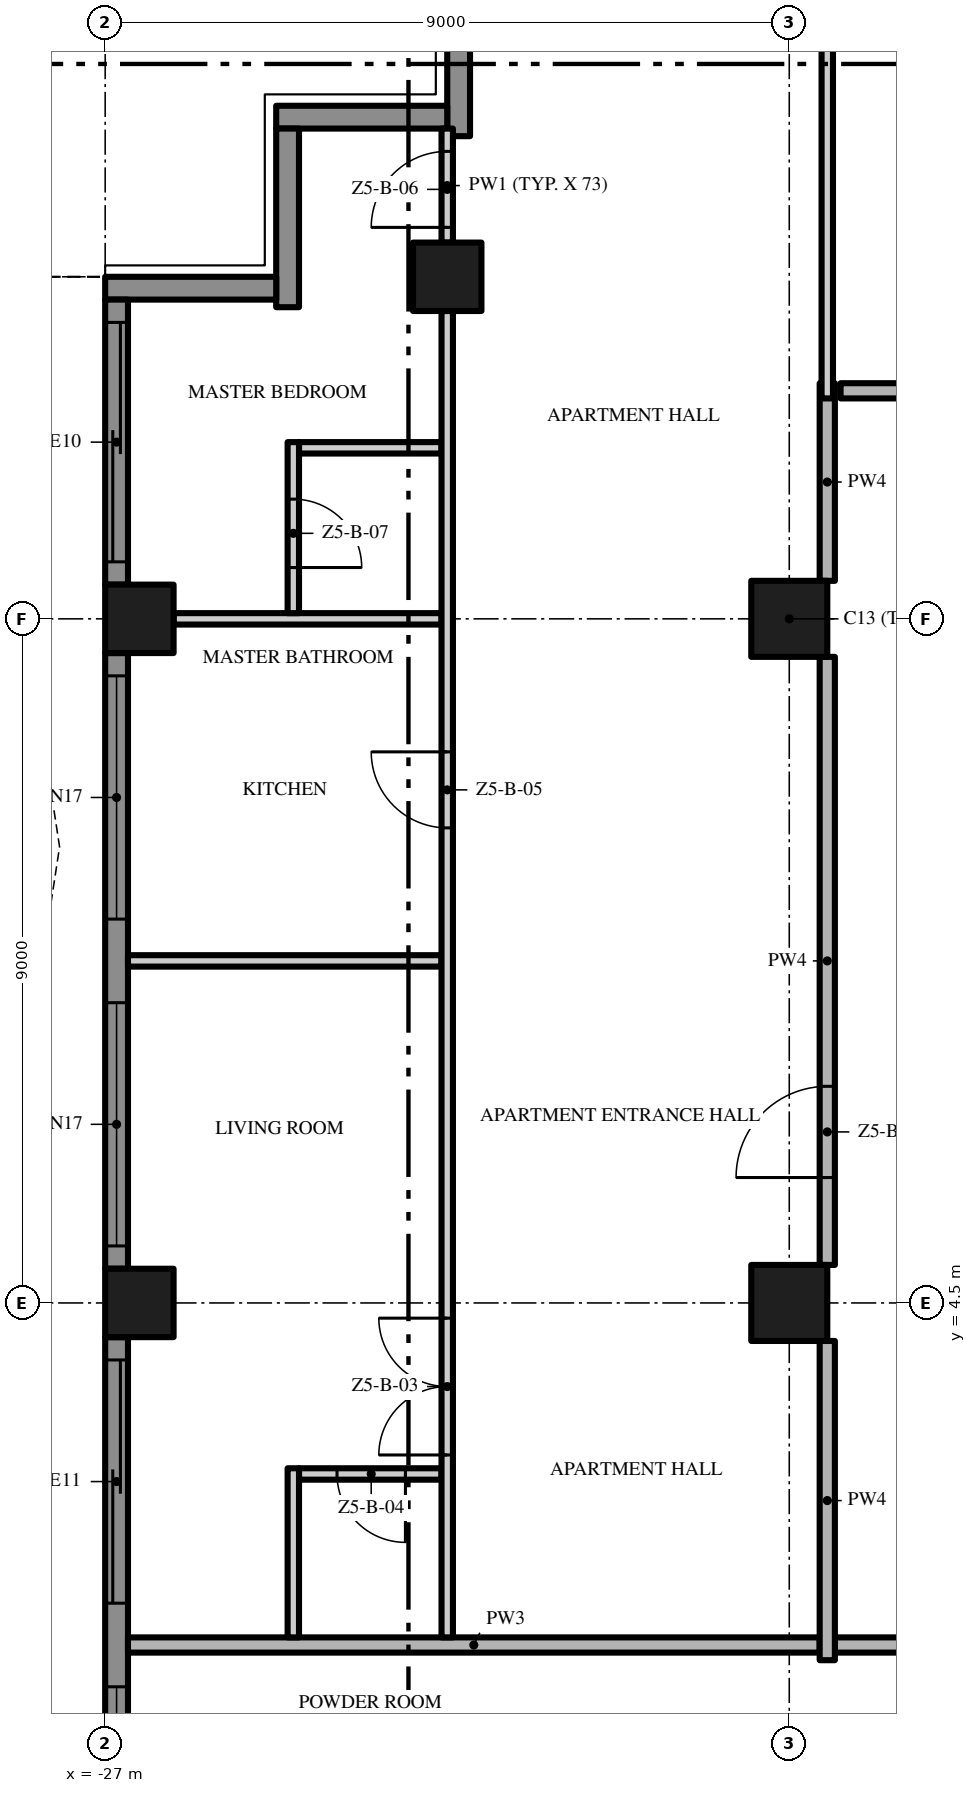
"""IFC4 building model, lengths in metres.
Left out: names, types, materials, properties, quantities, classifications, styles, units other than length and angle.
Written with IfcOpenShell. Run it as: python <this file> out.ifc"""

import sys

from ifc_helpers import new_model, si_unit, direction, frame, frame_2d, origin, origin_2d, place, context, subcontext, project, spatial, polyline, rectangle, outline, extrude, element, fill, save


model = new_model("IFC4")
c1 = context("Model", 3, precision=1e-05, world=origin(), true_north=direction((0.0, 1.0)))
c2 = subcontext(c1, "Body", "Model", "MODEL_VIEW")
j1 = project(units=[si_unit("LENGTHUNIT", "METRE"), si_unit("PLANEANGLEUNIT", "RADIAN")], contexts=[c1])
p1 = place(None, origin())
s1 = spatial("IfcSite", under=j1, at=p1, CompositionType="ELEMENT")
p2 = place(p1, origin())
s2 = spatial("IfcBuilding", under=s1, at=p2, CompositionType="ELEMENT")
p3 = place(p2, frame((0.0, 0.0, 250.2)))
s3 = spatial("IfcBuildingStorey", under=s2, at=p3, CompositionType="ELEMENT", Elevation=250.2)
for number, where, z_axis, x_axis in (
    (1, (-18.0, 13.5, 0.0), (0.0, 0.0, 1.0), (1.0, 0.0, 0.0)),
    (2, (-18.0, 4.5, 0.0), (0.0, 0.0, 1.0), (1.0, 0.0, 0.0)),
):
    element("IfcColumn", number, at=place(p3, frame(where, z_axis=z_axis, x_axis=x_axis)), inside=s3, PredefinedType="COLUMN", context=c2, shape_type="SweptSolid", body=[
        extrude(rectangle(XDim=1.0, YDim=1.0, at=origin_2d()), origin(), (0.0, 0.0, 1.0), 3.5),
    ])
for number, where, z_axis, x_axis in (
    (3, (-26.55, 13.5, 0.0), (0.0, 0.0, 1.0), (1.0, 0.0, 0.0)),
    (4, (-22.5, 18.0, 0.0), (0.0, 0.0, 1.0), (1.0, 0.0, 0.0)),
    (5, (-26.55, 4.5, 0.0), (0.0, 0.0, 1.0), (1.0, 0.0, 0.0)),
):
    element("IfcColumn", number, at=place(p3, frame(where, z_axis=z_axis, x_axis=x_axis)), inside=s3, PredefinedType="COLUMN", context=c2, shape_type="SweptSolid", body=[
        extrude(rectangle(XDim=0.9, YDim=0.9, at=origin_2d()), origin(), (0.0, 0.0, 1.0), 3.5),
    ])
p4 = place(p3, frame((-22.35, 19.85, 0.0), z_axis=(0.0, 0.0, 1.0), x_axis=(0.0, 1.0, 0.0)))
e6 = element("IfcWall", 6, at=p4, inside=s3, PredefinedType="SOLIDWALL", context=c2, shape_type="SweptSolid", body=[
    extrude(rectangle(XDim=2.35, YDim=0.3, at=frame_2d((1.175, 0.0))), origin(), (0.0, 0.0, 1.0), 3.5),
])
p5 = place(p3, frame((-24.75, 20.1, 0.0), z_axis=(0.0, 0.0, 1.0), x_axis=(1.0, 0.0, 0.0)))
e7 = element("IfcWall", 7, at=p5, inside=s3, PredefinedType="SOLIDWALL", context=c2, shape_type="SweptSolid", body=[
    extrude(rectangle(XDim=2.25, YDim=0.3, at=frame_2d((1.125, 0.0))), origin(), (0.0, 0.0, 1.0), 3.5),
])
p6 = place(p3, frame((-24.6, 17.6, 0.0), z_axis=(0.0, 0.0, 1.0), x_axis=(0.0, 1.0, 0.0)))
e8 = element("IfcWall", 8, at=p6, inside=s3, PredefinedType="SOLIDWALL", context=c2, shape_type="SweptSolid", body=[
    extrude(rectangle(XDim=2.35, YDim=0.3, at=frame_2d((1.175, 0.0))), origin(), (0.0, 0.0, 1.0), 3.5),
])
p7 = place(p3, frame((-27.0, 17.85, 0.0), z_axis=(0.0, 0.0, 1.0), x_axis=(1.0, 0.0, 0.0)))
e9 = element("IfcWall", 9, at=p7, inside=s3, PredefinedType="SOLIDWALL", context=c2, shape_type="SweptSolid", body=[
    extrude(rectangle(XDim=2.25, YDim=0.3, at=frame_2d((1.125, 0.0))), origin(), (0.0, 0.0, 1.0), 3.5),
])
p8 = place(p3, frame((-26.85, 13.95, 0.0), z_axis=(0.0, 0.0, 1.0), x_axis=(0.0, 1.0, 0.0)))
e10 = element("IfcWall", 10, at=p8, inside=s3, PredefinedType="SOLIDWALL", context=c2, shape_type="SweptSolid", body=[
    extrude(rectangle(XDim=3.75, YDim=0.3, at=frame_2d((1.875, 0.0))), origin(), (0.0, 0.0, 1.0), 3.5),
])
p9 = place(p8, frame((0.3, 0.0, 0.0)))
e11 = element("IfcOpeningElement", 11, at=p9, cuts=e10, PredefinedType="OPENING", context=c2, shape_type="SweptSolid", body=[
    extrude(rectangle(XDim=3.15, YDim=2.4, at=frame_2d((1.575, 1.2))), frame((0.0, 0.16, 0.0), z_axis=(0.0, -1.0, 0.0), x_axis=(1.0, 0.0, 0.0)), (0.0, 0.0, 1.0), 0.32),
])
p10 = place(p3, frame((-26.85, 4.95, 0.0), z_axis=(0.0, 0.0, 1.0), x_axis=(0.0, 1.0, 0.0)))
e12 = element("IfcWall", 12, at=p10, inside=s3, PredefinedType="SOLIDWALL", context=c2, shape_type="SweptSolid", body=[
    extrude(rectangle(XDim=8.1, YDim=0.3, at=frame_2d((4.05, 0.0))), origin(), (0.0, 0.0, 1.0), 3.5),
])
p11 = place(p10, frame((4.6, 0.0, 0.45)))
e13 = element("IfcOpeningElement", 13, at=p11, cuts=e12, PredefinedType="OPENING", context=c2, shape_type="SweptSolid", body=[
    extrude(rectangle(XDim=3.2, YDim=2.65, at=frame_2d((1.6, 1.325))), frame((0.0, 0.16, 0.0), z_axis=(0.0, -1.0, 0.0), x_axis=(1.0, 0.0, 0.0)), (0.0, 0.0, 1.0), 0.32),
])
p12 = place(p10, frame((0.3, 0.0, 0.45)))
e14 = element("IfcOpeningElement", 14, at=p12, cuts=e12, PredefinedType="OPENING", context=c2, shape_type="SweptSolid", body=[
    extrude(rectangle(XDim=3.2, YDim=2.65, at=frame_2d((1.6, 1.325))), frame((0.0, 0.16, 0.0), z_axis=(0.0, -1.0, 0.0), x_axis=(1.0, 0.0, 0.0)), (0.0, 0.0, 1.0), 0.32),
])
p13 = place(p3, frame((-26.85, -4.05, 0.0), z_axis=(0.0, 0.0, 1.0), x_axis=(0.0, 1.0, 0.0)))
e15 = element("IfcWall", 15, at=p13, inside=s3, PredefinedType="SOLIDWALL", context=c2, shape_type="SweptSolid", body=[
    extrude(rectangle(XDim=8.1, YDim=0.3, at=frame_2d((4.05, 0.0))), origin(), (0.0, 0.0, 1.0), 3.5),
])
p14 = place(p13, frame((4.6, 0.0, 0.0)))
e16 = element("IfcOpeningElement", 16, at=p14, cuts=e15, PredefinedType="OPENING", context=c2, shape_type="SweptSolid", body=[
    extrude(rectangle(XDim=3.2, YDim=2.4, at=frame_2d((1.6, 1.2))), frame((0.0, 0.16, 0.0), z_axis=(0.0, -1.0, 0.0), x_axis=(1.0, 0.0, 0.0)), (0.0, 0.0, 1.0), 0.32),
])
p15 = place(p13, frame((0.3, 0.0, 0.45)))
e17 = element("IfcOpeningElement", 17, at=p15, cuts=e15, PredefinedType="OPENING", context=c2, shape_type="SweptSolid", body=[
    extrude(rectangle(XDim=3.2, YDim=2.65, at=frame_2d((1.6, 1.325))), frame((0.0, 0.16, 0.0), z_axis=(0.0, -1.0, 0.0), x_axis=(1.0, 0.0, 0.0)), (0.0, 0.0, 1.0), 0.32),
])
p16 = place(p3, origin())
e18 = element("IfcWall", 18, at=p16, inside=s3, PredefinedType="USERDEFINED", context=c2, shape_type="SweptSolid", body=[
    extrude(outline(polyline([(-30.0, 18.0), (-29.771, 16.5), (-29.171, 15.0), (-28.429, 13.5), (-27.829, 12.0), (-27.6, 10.5), (-27.829, 9.0), (-28.429, 7.5), (-29.171, 6.0), (-29.771, 4.5), (-30.0, 3.0), (-29.771, 1.5), (-29.171, 0.0), (-28.429, -1.5), (-27.829, -3.0), (-27.6, -4.5), (-27.829, -6.0), (-28.429, -7.5), (-29.171, -9.0), (-29.771, -10.5), (-30.0, -12.0), (-29.771, -13.5), (-29.171, -15.0), (-28.429, -16.5), (-27.829, -18.0), (-27.597, -17.907), (-28.201, -16.398), (-28.942, -14.898), (-29.528, -13.434), (-29.747, -12.0), (-29.528, -10.566), (-28.942, -9.102), (-28.201, -7.602), (-27.586, -6.066), (-27.347, -4.5), (-27.586, -2.934), (-28.201, -1.398), (-28.942, 0.102), (-29.528, 1.566), (-29.747, 3.0), (-29.528, 4.434), (-28.942, 5.898), (-28.201, 7.398), (-27.586, 8.934), (-27.347, 10.5), (-27.586, 12.066), (-28.201, 13.602), (-28.942, 15.102), (-29.528, 16.566), (-29.753, 18.038), (-30.0, 18.0)])), origin(), (0.0, 0.0, 1.0), 0.9),
])
p17 = place(p3, frame((17.4, 0.0, 0.0), z_axis=(0.0, 0.0, 1.0), x_axis=(-1.0, 0.0, 0.0)))
e19 = element("IfcWall", 19, at=p17, inside=s3, PredefinedType="PARTITIONING", context=c2, shape_type="SweptSolid", body=[
    extrude(rectangle(XDim=34.8, YDim=0.2, at=frame_2d((17.4, 0.0))), origin(), (0.0, 0.0, 1.0), 3.5),
])
p18 = place(p17, frame((23.4, 0.0, 0.0)))
e20 = element("IfcOpeningElement", 20, at=p18, cuts=e19, PredefinedType="OPENING", context=c2, shape_type="SweptSolid", body=[
    extrude(rectangle(XDim=1.5, YDim=2.4, at=frame_2d((0.75, 1.2))), frame((0.0, 0.11, 0.0), z_axis=(0.0, -1.0, 0.0), x_axis=(1.0, 0.0, 0.0)), (0.0, 0.0, 1.0), 0.22),
])
p19 = place(p17, frame((5.4, 0.0, 0.0)))
e21 = element("IfcOpeningElement", 21, at=p19, cuts=e19, PredefinedType="OPENING", context=c2, shape_type="SweptSolid", body=[
    extrude(rectangle(XDim=1.5, YDim=2.4, at=frame_2d((0.75, 1.2))), frame((0.0, 0.11, 0.0), z_axis=(0.0, -1.0, 0.0), x_axis=(1.0, 0.0, 0.0)), (0.0, 0.0, 1.0), 0.22),
])
p20 = place(p3, frame((-26.7, 0.0, 0.0), z_axis=(0.0, 0.0, 1.0), x_axis=(1.0, 0.0, 0.0)))
e22 = element("IfcWall", 22, at=p20, inside=s3, PredefinedType="PARTITIONING", context=c2, shape_type="SweptSolid", body=[
    extrude(rectangle(XDim=9.1, YDim=0.2, at=frame_2d((4.55, 0.0))), origin(), (0.0, 0.0, 1.0), 3.5),
])
p21 = place(p3, frame((-22.575, 2.25, 0.0), z_axis=(0.0, 0.0, 1.0), x_axis=(-1.0, 0.0, 0.0)))
e23 = element("IfcWall", 23, at=p21, inside=s3, PredefinedType="PARTITIONING", context=c2, shape_type="SweptSolid", body=[
    extrude(rectangle(XDim=1.875, YDim=0.15, at=frame_2d((0.938, 0.0))), origin(), (0.0, 0.0, 1.0), 3.5),
])
p22 = place(p21, frame((0.475, 0.0, 0.0)))
e24 = element("IfcOpeningElement", 24, at=p22, cuts=e23, PredefinedType="OPENING", context=c2, shape_type="SweptSolid", body=[
    extrude(rectangle(XDim=0.9, YDim=2.1, at=frame_2d((0.45, 1.05))), frame((0.0, 0.085, 0.0), z_axis=(0.0, -1.0, 0.0), x_axis=(1.0, 0.0, 0.0)), (0.0, 0.0, 1.0), 0.17),
])
p23 = place(p3, frame((-26.7, 9.0, 0.0), z_axis=(0.0, 0.0, 1.0), x_axis=(1.0, 0.0, 0.0)))
e25 = element("IfcWall", 25, at=p23, inside=s3, PredefinedType="PARTITIONING", context=c2, shape_type="SweptSolid", body=[
    extrude(rectangle(XDim=4.125, YDim=0.15, at=frame_2d((2.062, 0.0))), origin(), (0.0, 0.0, 1.0), 3.5),
])
p24 = place(p3, frame((-26.1, 13.5, 0.0), z_axis=(0.0, 0.0, 1.0), x_axis=(1.0, 0.0, 0.0)))
e26 = element("IfcWall", 26, at=p24, inside=s3, PredefinedType="PARTITIONING", context=c2, shape_type="SweptSolid", body=[
    extrude(rectangle(XDim=3.525, YDim=0.15, at=frame_2d((1.762, 0.0))), origin(), (0.0, 0.0, 1.0), 3.5),
])
p25 = place(p3, frame((-24.45, 15.75, 0.0), z_axis=(0.0, 0.0, 1.0), x_axis=(1.0, 0.0, 0.0)))
e27 = element("IfcWall", 27, at=p25, inside=s3, PredefinedType="PARTITIONING", context=c2, shape_type="SweptSolid", body=[
    extrude(rectangle(XDim=1.875, YDim=0.15, at=frame_2d((0.938, 0.0))), origin(), (0.0, 0.0, 1.0), 3.5),
])
p26 = place(p3, frame((-17.325, 16.5, 0.0), z_axis=(0.0, 0.0, 1.0), x_axis=(1.0, 0.0, 0.0)))
e28 = element("IfcWall", 28, at=p26, inside=s3, PredefinedType="PARTITIONING", context=c2, shape_type="SweptSolid", body=[
    extrude(rectangle(XDim=3.825, YDim=0.2, at=frame_2d((1.913, 0.0))), origin(), (0.0, 0.0, 1.0), 3.5),
])
p27 = place(p26, frame((1.35, 0.0, 0.0)))
e29 = element("IfcOpeningElement", 29, at=p27, cuts=e28, PredefinedType="OPENING", context=c2, shape_type="SweptSolid", body=[
    extrude(rectangle(XDim=0.9, YDim=2.1, at=frame_2d((0.45, 1.05))), frame((0.0, 0.11, 0.0), z_axis=(0.0, -1.0, 0.0), x_axis=(1.0, 0.0, 0.0)), (0.0, 0.0, 1.0), 0.22),
])
p28 = place(p3, frame((-24.525, 0.1, 0.0), z_axis=(0.0, 0.0, 1.0), x_axis=(0.0, 1.0, 0.0)))
e30 = element("IfcWall", 30, at=p28, inside=s3, PredefinedType="PARTITIONING", context=c2, shape_type="SweptSolid", body=[
    extrude(rectangle(XDim=2.225, YDim=0.15, at=frame_2d((1.113, 0.0))), origin(), (0.0, 0.0, 1.0), 3.5),
])
p29 = place(p3, frame((-24.525, 15.825, 0.0), z_axis=(0.0, 0.0, 1.0), x_axis=(0.0, -1.0, 0.0)))
e31 = element("IfcWall", 31, at=p29, inside=s3, PredefinedType="PARTITIONING", context=c2, shape_type="SweptSolid", body=[
    extrude(rectangle(XDim=2.25, YDim=0.15, at=frame_2d((1.125, 0.0))), origin(), (0.0, 0.0, 1.0), 3.5),
])
p30 = place(p29, frame((0.75, 0.0, 0.0)))
e32 = element("IfcOpeningElement", 32, at=p30, cuts=e31, PredefinedType="OPENING", context=c2, shape_type="SweptSolid", body=[
    extrude(rectangle(XDim=0.9, YDim=2.1, at=frame_2d((0.45, 1.05))), frame((0.0, 0.085, 0.0), z_axis=(0.0, -1.0, 0.0), x_axis=(1.0, 0.0, 0.0)), (0.0, 0.0, 1.0), 0.17),
])
p31 = place(p3, frame((-22.5, 0.1, 0.0), z_axis=(0.0, 0.0, 1.0), x_axis=(0.0, 1.0, 0.0)))
e33 = element("IfcWall", 33, at=p31, inside=s3, PredefinedType="PARTITIONING", context=c2, shape_type="SweptSolid", body=[
    extrude(rectangle(XDim=17.45, YDim=0.15, at=frame_2d((8.725, 0.0))), origin(), (0.0, 0.0, 1.0), 3.5),
])
p32 = place(p31, frame((2.4, 0.0, 0.0)))
e34 = element("IfcOpeningElement", 34, at=p32, cuts=e33, PredefinedType="OPENING", context=c2, shape_type="SweptSolid", body=[
    extrude(rectangle(XDim=1.8, YDim=2.4, at=frame_2d((0.9, 1.2))), frame((0.0, 0.085, 0.0), z_axis=(0.0, -1.0, 0.0), x_axis=(1.0, 0.0, 0.0)), (0.0, 0.0, 1.0), 0.17),
])
p33 = place(p31, frame((10.65, 0.0, 0.0)))
e35 = element("IfcOpeningElement", 35, at=p33, cuts=e33, PredefinedType="OPENING", context=c2, shape_type="SweptSolid", body=[
    extrude(rectangle(XDim=1.0, YDim=2.4, at=frame_2d((0.5, 1.2))), frame((0.0, 0.085, 0.0), z_axis=(0.0, -1.0, 0.0), x_axis=(1.0, 0.0, 0.0)), (0.0, 0.0, 1.0), 0.17),
])
p34 = place(p3, frame((-22.5, 18.45, 0.0), z_axis=(0.0, 0.0, 1.0), x_axis=(0.0, 1.0, 0.0)))
e36 = element("IfcWall", 36, at=p34, inside=s3, PredefinedType="PARTITIONING", context=c2, shape_type="SweptSolid", body=[
    extrude(rectangle(XDim=1.5, YDim=0.15, at=frame_2d((0.75, 0.0))), origin(), (0.0, 0.0, 1.0), 3.5),
])
p35 = place(p34, frame((0.2, 0.0, 0.0)))
e37 = element("IfcOpeningElement", 37, at=p35, cuts=e36, PredefinedType="OPENING", context=c2, shape_type="SweptSolid", body=[
    extrude(rectangle(XDim=1.0, YDim=2.4, at=frame_2d((0.5, 1.2))), frame((0.0, 0.085, 0.0), z_axis=(0.0, -1.0, 0.0), x_axis=(1.0, 0.0, 0.0)), (0.0, 0.0, 1.0), 0.17),
])
p36 = place(p3, frame((-17.5, -0.2, 0.0), z_axis=(0.0, 0.0, 1.0), x_axis=(0.0, 1.0, 0.0)))
e38 = element("IfcWall", 38, at=p36, inside=s3, PredefinedType="PARTITIONING", context=c2, shape_type="SweptSolid", body=[
    extrude(rectangle(XDim=4.2, YDim=0.2, at=frame_2d((2.1, 0.0))), origin(), (0.0, 0.0, 1.0), 3.5),
])
p37 = place(p3, frame((-17.5, 5.0, 0.0), z_axis=(0.0, 0.0, 1.0), x_axis=(0.0, 1.0, 0.0)))
e39 = element("IfcWall", 39, at=p37, inside=s3, PredefinedType="PARTITIONING", context=c2, shape_type="SweptSolid", body=[
    extrude(rectangle(XDim=8.0, YDim=0.2, at=frame_2d((4.0, 0.0))), origin(), (0.0, 0.0, 1.0), 3.5),
])
p38 = place(p37, frame((1.15, 0.0, 0.0)))
e40 = element("IfcOpeningElement", 40, at=p38, cuts=e39, PredefinedType="OPENING", context=c2, shape_type="SweptSolid", body=[
    extrude(rectangle(XDim=1.2, YDim=2.4, at=frame_2d((0.6, 1.2))), frame((0.0, 0.11, 0.0), z_axis=(0.0, -1.0, 0.0), x_axis=(1.0, 0.0, 0.0)), (0.0, 0.0, 1.0), 0.22),
])
p39 = place(p3, frame((-17.5, 14.0, 0.0), z_axis=(0.0, 0.0, 1.0), x_axis=(0.0, 1.0, 0.0)))
e41 = element("IfcWall", 41, at=p39, inside=s3, PredefinedType="PARTITIONING", context=c2, shape_type="SweptSolid", body=[
    extrude(rectangle(XDim=2.6, YDim=0.2, at=frame_2d((1.3, 0.0))), origin(), (0.0, 0.0, 1.0), 3.5),
])
p40 = place(p3, frame((-17.5, 16.4, 0.0), z_axis=(0.0, 0.0, 1.0), x_axis=(0.0, 1.0, 0.0)))
e42 = element("IfcWall", 42, at=p40, inside=s3, PredefinedType="PARTITIONING", context=c2, shape_type="SweptSolid", body=[
    extrude(rectangle(XDim=5.2, YDim=0.15, at=frame_2d((2.6, 0.0))), origin(), (0.0, 0.0, 1.0), 3.5),
])
p41 = place(p9, origin())
e43 = element("IfcDoor", 43, at=p41, inside=s3, OperationType="SINGLE_SWING_LEFT", PredefinedType="DOOR", context=c2, shape_type="SweptSolid", body=[
    extrude(rectangle(XDim=3.15, YDim=2.4, at=frame_2d((1.575, 1.2))), frame((0.0, 0.025, 0.0), z_axis=(0.0, -1.0, 0.0), x_axis=(1.0, 0.0, 0.0)), (0.0, 0.0, 1.0), 0.05),
])
fill(e11, e43)
p42 = place(p11, origin())
e44 = element("IfcWindow", 44, at=p42, inside=s3, PartitioningType="SINGLE_PANEL", PredefinedType="WINDOW", context=c2, shape_type="SweptSolid", body=[
    extrude(rectangle(XDim=3.2, YDim=2.65, at=frame_2d((1.6, 1.325))), frame((0.0, 0.03, 0.0), z_axis=(0.0, -1.0, 0.0), x_axis=(1.0, 0.0, 0.0)), (0.0, 0.0, 1.0), 0.06),
])
fill(e13, e44)
p43 = place(p12, origin())
e45 = element("IfcWindow", 45, at=p43, inside=s3, PartitioningType="SINGLE_PANEL", PredefinedType="WINDOW", context=c2, shape_type="SweptSolid", body=[
    extrude(rectangle(XDim=3.2, YDim=2.65, at=frame_2d((1.6, 1.325))), frame((0.0, 0.03, 0.0), z_axis=(0.0, -1.0, 0.0), x_axis=(1.0, 0.0, 0.0)), (0.0, 0.0, 1.0), 0.06),
])
fill(e14, e45)
p44 = place(p14, origin())
e46 = element("IfcDoor", 46, at=p44, inside=s3, OperationType="SINGLE_SWING_LEFT", PredefinedType="DOOR", context=c2, shape_type="SweptSolid", body=[
    extrude(rectangle(XDim=3.2, YDim=2.4, at=frame_2d((1.6, 1.2))), frame((0.0, 0.025, 0.0), z_axis=(0.0, -1.0, 0.0), x_axis=(1.0, 0.0, 0.0)), (0.0, 0.0, 1.0), 0.05),
])
fill(e16, e46)
p45 = place(p15, origin())
e47 = element("IfcWindow", 47, at=p45, inside=s3, PartitioningType="SINGLE_PANEL", PredefinedType="WINDOW", context=c2, shape_type="SweptSolid", body=[
    extrude(rectangle(XDim=3.2, YDim=2.65, at=frame_2d((1.6, 1.325))), frame((0.0, 0.03, 0.0), z_axis=(0.0, -1.0, 0.0), x_axis=(1.0, 0.0, 0.0)), (0.0, 0.0, 1.0), 0.06),
])
fill(e17, e47)
p46 = place(p38, origin())
e48 = element("IfcDoor", 48, at=p46, inside=s3, OperationType="SINGLE_SWING_LEFT", PredefinedType="DOOR", context=c2, shape_type="SweptSolid", body=[
    extrude(rectangle(XDim=1.2, YDim=2.4, at=frame_2d((0.6, 1.2))), frame((0.0, 0.025, 0.0), z_axis=(0.0, -1.0, 0.0), x_axis=(1.0, 0.0, 0.0)), (0.0, 0.0, 1.0), 0.05),
])
fill(e40, e48)
p47 = place(p32, origin())
e49 = element("IfcDoor", 49, at=p47, inside=s3, OperationType="DOUBLE_DOOR_SINGLE_SWING", PredefinedType="DOOR", context=c2, shape_type="SweptSolid", body=[
    extrude(rectangle(XDim=1.8, YDim=2.4, at=frame_2d((0.9, 1.2))), frame((0.0, 0.025, 0.0), z_axis=(0.0, -1.0, 0.0), x_axis=(1.0, 0.0, 0.0)), (0.0, 0.0, 1.0), 0.05),
])
fill(e34, e49)
p48 = place(p22, origin())
e50 = element("IfcDoor", 50, at=p48, inside=s3, OperationType="SINGLE_SWING_LEFT", PredefinedType="DOOR", context=c2, shape_type="SweptSolid", body=[
    extrude(rectangle(XDim=0.9, YDim=2.1, at=frame_2d((0.45, 1.05))), frame((0.0, 0.025, 0.0), z_axis=(0.0, -1.0, 0.0), x_axis=(1.0, 0.0, 0.0)), (0.0, 0.0, 1.0), 0.05),
])
fill(e24, e50)
p49 = place(p33, origin())
e51 = element("IfcDoor", 51, at=p49, inside=s3, OperationType="SINGLE_SWING_RIGHT", PredefinedType="DOOR", context=c2, shape_type="SweptSolid", body=[
    extrude(rectangle(XDim=1.0, YDim=2.4, at=frame_2d((0.5, 1.2))), frame((0.0, 0.025, 0.0), z_axis=(0.0, -1.0, 0.0), x_axis=(1.0, 0.0, 0.0)), (0.0, 0.0, 1.0), 0.05),
])
fill(e35, e51)
p50 = place(p35, origin())
e52 = element("IfcDoor", 52, at=p50, inside=s3, OperationType="SINGLE_SWING_LEFT", PredefinedType="DOOR", context=c2, shape_type="SweptSolid", body=[
    extrude(rectangle(XDim=1.0, YDim=2.4, at=frame_2d((0.5, 1.2))), frame((0.0, 0.025, 0.0), z_axis=(0.0, -1.0, 0.0), x_axis=(1.0, 0.0, 0.0)), (0.0, 0.0, 1.0), 0.05),
])
fill(e37, e52)
p51 = place(p30, origin())
e53 = element("IfcDoor", 53, at=p51, inside=s3, OperationType="SINGLE_SWING_RIGHT", PredefinedType="DOOR", context=c2, shape_type="SweptSolid", body=[
    extrude(rectangle(XDim=0.9, YDim=2.1, at=frame_2d((0.45, 1.05))), frame((0.0, 0.025, 0.0), z_axis=(0.0, -1.0, 0.0), x_axis=(1.0, 0.0, 0.0)), (0.0, 0.0, 1.0), 0.05),
])
fill(e32, e53)
save(model, sys.argv[1])
